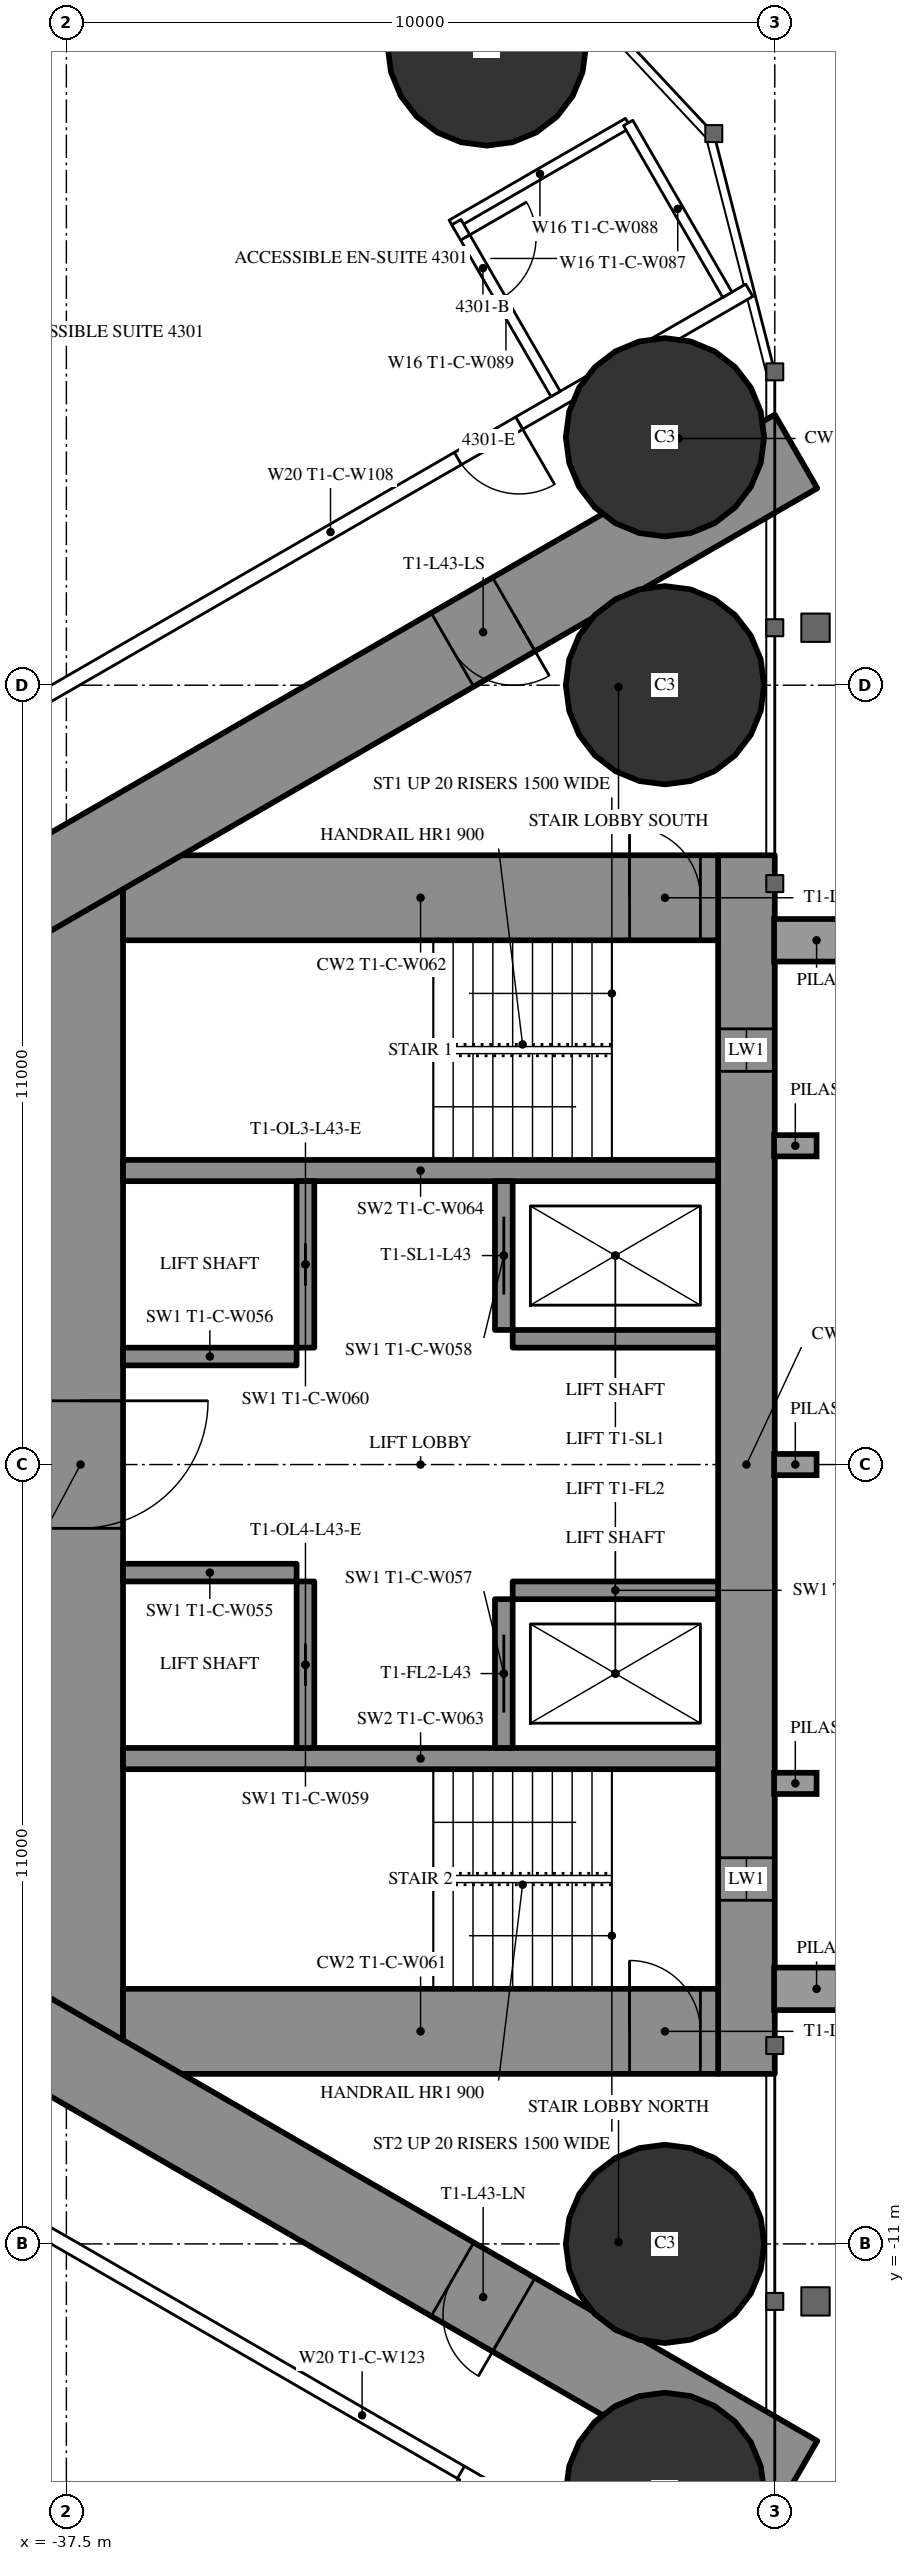
"""IFC4 building model, lengths in metres.
Left out: names, types, materials, properties, quantities, classifications, styles, units other than length and angle.
Written with IfcOpenShell. Run it as: python <this file> out.ifc"""

import sys

from ifc_helpers import new_model, si_unit, direction, frame, frame_2d, origin, origin_2d, place, context, subcontext, project, spatial, rectangle, circle, extrude, element, fill, save


model = new_model("IFC4")
c1 = context("Model", 3, precision=1e-05, world=origin(), true_north=direction((0.0, 1.0)))
c2 = subcontext(c1, "Body", "Model", "MODEL_VIEW")
j1 = project(units=[si_unit("LENGTHUNIT", "METRE"), si_unit("PLANEANGLEUNIT", "RADIAN")], contexts=[c1])
p1 = place(None, origin())
s1 = spatial("IfcSite", under=j1, at=p1, CompositionType="ELEMENT")
p2 = place(p1, origin())
s2 = spatial("IfcBuilding", under=s1, at=p2, CompositionType="ELEMENT")
p3 = place(p2, frame((0.0, 0.0, 163.3)))
s3 = spatial("IfcBuildingStorey", under=s2, at=p3, CompositionType="ELEMENT", Elevation=163.3)
for number, where, z_axis, x_axis in (
    (1, (-31.565, 20.016, 0.0), (0.0, 0.0, 1.0), (1.0, 0.0, 0.0)),
    (2, (-29.05, -11.0, 0.0), (0.0, 0.0, 1.0), (1.0, 0.0, 0.0)),
    (3, (-29.05, 11.0, 0.0), (0.0, 0.0, 1.0), (1.0, 0.0, 0.0)),
    (4, (-29.05, 14.5, 0.0), (0.0, 0.0, 1.0), (1.0, 0.0, 0.0)),
    (5, (-29.05, -14.5, 0.0), (0.0, 0.0, 1.0), (1.0, 0.0, 0.0)),
):
    element("IfcColumn", number, at=place(p3, frame(where, z_axis=z_axis, x_axis=x_axis)), inside=s3, PredefinedType="COLUMN", context=c2, shape_type="SweptSolid", body=[
        extrude(circle(Radius=1.4, at=origin_2d()), origin(), (0.0, 0.0, 1.0), 3.5),
    ])
p4 = place(p3, frame((-27.9, 8.6, 0.0), z_axis=(0.0, 0.0, 1.0), x_axis=(0.0, -1.0, 0.0)))
e6 = element("IfcWall", 6, at=p4, inside=s3, PredefinedType="SHEAR", context=c2, shape_type="SweptSolid", body=[
    extrude(rectangle(XDim=17.2, YDim=0.8, at=frame_2d((8.6, 0.0))), origin(), (0.0, 0.0, 1.0), 3.5),
])
p5 = place(p4, frame((2.45, 0.0, 0.6)))
e7 = element("IfcOpeningElement", 7, at=p5, cuts=e6, PredefinedType="OPENING", context=c2, shape_type="SweptSolid", body=[
    extrude(rectangle(XDim=0.6, YDim=2.1, at=frame_2d((0.3, 1.05))), frame((0.0, 0.41, 0.0), z_axis=(0.0, -1.0, 0.0), x_axis=(1.0, 0.0, 0.0)), (0.0, 0.0, 1.0), 0.82),
])
p6 = place(p4, frame((14.15, 0.0, 0.6)))
e8 = element("IfcOpeningElement", 8, at=p6, cuts=e6, PredefinedType="OPENING", context=c2, shape_type="SweptSolid", body=[
    extrude(rectangle(XDim=0.6, YDim=2.1, at=frame_2d((0.3, 1.05))), frame((0.0, 0.41, 0.0), z_axis=(0.0, -1.0, 0.0), x_axis=(1.0, 0.0, 0.0)), (0.0, 0.0, 1.0), 0.82),
])
p7 = place(p3, frame((-37.3, 8.6, 0.0), z_axis=(0.0, 0.0, 1.0), x_axis=(0.0, -1.0, 0.0)))
e9 = element("IfcWall", 9, at=p7, inside=s3, PredefinedType="SHEAR", context=c2, shape_type="SweptSolid", body=[
    extrude(rectangle(XDim=17.2, YDim=1.2, at=frame_2d((8.6, 0.0))), origin(), (0.0, 0.0, 1.0), 3.5),
])
p8 = place(p7, frame((7.7, 0.0, 0.0)))
e10 = element("IfcOpeningElement", 10, at=p8, cuts=e9, PredefinedType="OPENING", context=c2, shape_type="SweptSolid", body=[
    extrude(rectangle(XDim=1.8, YDim=2.2, at=frame_2d((0.9, 1.1))), frame((0.0, 0.61, 0.0), z_axis=(0.0, -1.0, 0.0), x_axis=(1.0, 0.0, 0.0)), (0.0, 0.0, 1.0), 1.22),
])
p9 = place(p3, frame((-28.3, 8.0, 0.0), z_axis=(0.0, 0.0, 1.0), x_axis=(-1.0, 0.0, 0.0)))
e11 = element("IfcWall", 11, at=p9, inside=s3, PredefinedType="SHEAR", context=c2, shape_type="SweptSolid", body=[
    extrude(rectangle(XDim=8.4, YDim=1.2, at=frame_2d((4.2, 0.0))), origin(), (0.0, 0.0, 1.0), 3.5),
])
p10 = place(p9, frame((0.25, 0.0, 0.0)))
e12 = element("IfcOpeningElement", 12, at=p10, cuts=e11, PredefinedType="OPENING", context=c2, shape_type="SweptSolid", body=[
    extrude(rectangle(XDim=1.0, YDim=2.2, at=frame_2d((0.5, 1.1))), frame((0.0, 0.61, 0.0), z_axis=(0.0, -1.0, 0.0), x_axis=(1.0, 0.0, 0.0)), (0.0, 0.0, 1.0), 1.22),
])
p11 = place(p3, frame((-28.3, -8.0, 0.0), z_axis=(0.0, 0.0, 1.0), x_axis=(-1.0, 0.0, 0.0)))
e13 = element("IfcWall", 13, at=p11, inside=s3, PredefinedType="SHEAR", context=c2, shape_type="SweptSolid", body=[
    extrude(rectangle(XDim=8.4, YDim=1.2, at=frame_2d((4.2, 0.0))), origin(), (0.0, 0.0, 1.0), 3.5),
])
p12 = place(p11, frame((0.25, 0.0, 0.0)))
e14 = element("IfcOpeningElement", 14, at=p12, cuts=e13, PredefinedType="OPENING", context=c2, shape_type="SweptSolid", body=[
    extrude(rectangle(XDim=1.0, YDim=2.2, at=frame_2d((0.5, 1.1))), frame((0.0, 0.61, 0.0), z_axis=(0.0, -1.0, 0.0), x_axis=(1.0, 0.0, 0.0)), (0.0, 0.0, 1.0), 1.22),
])
for number, where, z_axis, x_axis in (
    (15, (-28.3, 4.15, 0.0), (0.0, 0.0, 1.0), (-1.0, 0.0, 0.0)),
    (16, (-28.3, -4.15, 0.0), (0.0, 0.0, 1.0), (-1.0, 0.0, 0.0)),
):
    element("IfcWall", number, at=place(p3, frame(where, z_axis=z_axis, x_axis=x_axis)), inside=s3, PredefinedType="SHEAR", context=c2, shape_type="SweptSolid", body=[
        extrude(rectangle(XDim=8.4, YDim=0.3, at=frame_2d((4.2, 0.0))), origin(), (0.0, 0.0, 1.0), 3.5),
    ])
p13 = place(p3, frame((-31.325, 4.0, 0.0), z_axis=(0.0, 0.0, 1.0), x_axis=(0.0, -1.0, 0.0)))
e17 = element("IfcWall", 17, at=p13, inside=s3, PredefinedType="SHEAR", context=c2, shape_type="SweptSolid", body=[
    extrude(rectangle(XDim=2.1, YDim=0.25, at=frame_2d((1.05, 0.0))), origin(), (0.0, 0.0, 1.0), 3.5),
])
p14 = place(p13, frame((0.5, 0.0, 0.0)))
e18 = element("IfcOpeningElement", 18, at=p14, cuts=e17, PredefinedType="OPENING", context=c2, shape_type="SweptSolid", body=[
    extrude(rectangle(XDim=1.1, YDim=2.2, at=frame_2d((0.55, 1.1))), frame((0.0, 0.135, 0.0), z_axis=(0.0, -1.0, 0.0), x_axis=(1.0, 0.0, 0.0)), (0.0, 0.0, 1.0), 0.27),
])
p15 = place(p3, frame((-34.125, 4.0, 0.0), z_axis=(0.0, 0.0, 1.0), x_axis=(0.0, -1.0, 0.0)))
e19 = element("IfcWall", 19, at=p15, inside=s3, PredefinedType="SHEAR", context=c2, shape_type="SweptSolid", body=[
    extrude(rectangle(XDim=2.35, YDim=0.25, at=frame_2d((1.175, 0.0))), origin(), (0.0, 0.0, 1.0), 3.5),
])
p16 = place(p15, frame((0.875, 0.0, 0.0)))
e20 = element("IfcOpeningElement", 20, at=p16, cuts=e19, PredefinedType="OPENING", context=c2, shape_type="SweptSolid", body=[
    extrude(rectangle(XDim=0.6, YDim=2.0, at=frame_2d((0.3, 1.0))), frame((0.0, 0.135, 0.0), z_axis=(0.0, -1.0, 0.0), x_axis=(1.0, 0.0, 0.0)), (0.0, 0.0, 1.0), 0.27),
])
p17 = place(p3, frame((-28.3, 1.775, 0.0), z_axis=(0.0, 0.0, 1.0), x_axis=(-1.0, 0.0, 0.0)))
e21 = element("IfcWall", 21, at=p17, inside=s3, PredefinedType="SHEAR", context=c2, shape_type="SweptSolid", body=[
    extrude(rectangle(XDim=2.9, YDim=0.25, at=frame_2d((1.45, 0.0))), origin(), (0.0, 0.0, 1.0), 3.5),
])
p18 = place(p3, frame((-34.25, 1.525, 0.0), z_axis=(0.0, 0.0, 1.0), x_axis=(-1.0, 0.0, 0.0)))
e22 = element("IfcWall", 22, at=p18, inside=s3, PredefinedType="SHEAR", context=c2, shape_type="SweptSolid", body=[
    extrude(rectangle(XDim=2.45, YDim=0.25, at=frame_2d((1.225, 0.0))), origin(), (0.0, 0.0, 1.0), 3.5),
])
p19 = place(p3, frame((-31.325, -1.9, 0.0), z_axis=(0.0, 0.0, 1.0), x_axis=(0.0, -1.0, 0.0)))
e23 = element("IfcWall", 23, at=p19, inside=s3, PredefinedType="SHEAR", context=c2, shape_type="SweptSolid", body=[
    extrude(rectangle(XDim=2.1, YDim=0.25, at=frame_2d((1.05, 0.0))), origin(), (0.0, 0.0, 1.0), 3.5),
])
p20 = place(p19, frame((0.5, 0.0, 0.0)))
e24 = element("IfcOpeningElement", 24, at=p20, cuts=e23, PredefinedType="OPENING", context=c2, shape_type="SweptSolid", body=[
    extrude(rectangle(XDim=1.1, YDim=2.2, at=frame_2d((0.55, 1.1))), frame((0.0, 0.135, 0.0), z_axis=(0.0, -1.0, 0.0), x_axis=(1.0, 0.0, 0.0)), (0.0, 0.0, 1.0), 0.27),
])
p21 = place(p3, frame((-34.125, -1.65, 0.0), z_axis=(0.0, 0.0, 1.0), x_axis=(0.0, -1.0, 0.0)))
e25 = element("IfcWall", 25, at=p21, inside=s3, PredefinedType="SHEAR", context=c2, shape_type="SweptSolid", body=[
    extrude(rectangle(XDim=2.35, YDim=0.25, at=frame_2d((1.175, 0.0))), origin(), (0.0, 0.0, 1.0), 3.5),
])
p22 = place(p21, frame((0.875, 0.0, 0.0)))
e26 = element("IfcOpeningElement", 26, at=p22, cuts=e25, PredefinedType="OPENING", context=c2, shape_type="SweptSolid", body=[
    extrude(rectangle(XDim=0.6, YDim=2.0, at=frame_2d((0.3, 1.0))), frame((0.0, 0.135, 0.0), z_axis=(0.0, -1.0, 0.0), x_axis=(1.0, 0.0, 0.0)), (0.0, 0.0, 1.0), 0.27),
])
p23 = place(p3, frame((-28.3, -1.775, 0.0), z_axis=(0.0, 0.0, 1.0), x_axis=(-1.0, 0.0, 0.0)))
e27 = element("IfcWall", 27, at=p23, inside=s3, PredefinedType="SHEAR", context=c2, shape_type="SweptSolid", body=[
    extrude(rectangle(XDim=2.9, YDim=0.25, at=frame_2d((1.45, 0.0))), origin(), (0.0, 0.0, 1.0), 3.5),
])
p24 = place(p3, frame((-34.25, -1.525, 0.0), z_axis=(0.0, 0.0, 1.0), x_axis=(-1.0, 0.0, 0.0)))
e28 = element("IfcWall", 28, at=p24, inside=s3, PredefinedType="SHEAR", context=c2, shape_type="SweptSolid", body=[
    extrude(rectangle(XDim=2.45, YDim=0.25, at=frame_2d((1.225, 0.0))), origin(), (0.0, 0.0, 1.0), 3.5),
])
p25 = place(p3, frame((-27.2, 14.3, 0.0), z_axis=(0.0, 0.0, 1.0), x_axis=(-0.866026593062, -0.499997940104, 0.0)))
e29 = element("IfcWall", 29, at=p25, inside=s3, PredefinedType="SHEAR", context=c2, shape_type="SweptSolid", body=[
    extrude(rectangle(XDim=28.946, YDim=1.2, at=frame_2d((14.473, 0.0))), origin(), (0.0, 0.0, 1.0), 3.5),
])
p26 = place(p25, frame((4.6, 0.0, 0.0)))
e30 = element("IfcOpeningElement", 30, at=p26, cuts=e29, PredefinedType="OPENING", context=c2, shape_type="SweptSolid", body=[
    extrude(rectangle(XDim=1.0, YDim=2.2, at=frame_2d((0.5, 1.1))), frame((0.0, 0.61, 0.0), z_axis=(0.0, -1.0, 0.0), x_axis=(1.0, 0.0, 0.0)), (0.0, 0.0, 1.0), 1.22),
])
p27 = place(p25, frame((13.395, 0.0, 0.0)))
e31 = element("IfcOpeningElement", 31, at=p27, cuts=e29, PredefinedType="OPENING", context=c2, shape_type="SweptSolid", body=[
    extrude(rectangle(XDim=1.8, YDim=2.2, at=frame_2d((0.9, 1.1))), frame((0.0, 0.61, 0.0), z_axis=(0.0, -1.0, 0.0), x_axis=(1.0, 0.0, 0.0)), (0.0, 0.0, 1.0), 1.22),
])
p28 = place(p3, frame((-27.2, -14.3, 0.0), z_axis=(0.0, 0.0, 1.0), x_axis=(-0.866024021859, 0.500002393557, 0.0)))
e32 = element("IfcWall", 32, at=p28, inside=s3, PredefinedType="SHEAR", context=c2, shape_type="SweptSolid", body=[
    extrude(rectangle(XDim=27.907, YDim=1.2, at=frame_2d((13.954, 0.0))), origin(), (0.0, 0.0, 1.0), 3.5),
])
p29 = place(p28, frame((4.6, 0.0, 0.0)))
e33 = element("IfcOpeningElement", 33, at=p29, cuts=e32, PredefinedType="OPENING", context=c2, shape_type="SweptSolid", body=[
    extrude(rectangle(XDim=1.0, YDim=2.2, at=frame_2d((0.5, 1.1))), frame((0.0, 0.61, 0.0), z_axis=(0.0, -1.0, 0.0), x_axis=(1.0, 0.0, 0.0)), (0.0, 0.0, 1.0), 1.22),
])
p30 = place(p28, frame((13.395, 0.0, 0.0)))
e34 = element("IfcOpeningElement", 34, at=p30, cuts=e32, PredefinedType="OPENING", context=c2, shape_type="SweptSolid", body=[
    extrude(rectangle(XDim=1.8, YDim=2.2, at=frame_2d((0.9, 1.1))), frame((0.0, 0.61, 0.0), z_axis=(0.0, -1.0, 0.0), x_axis=(1.0, 0.0, 0.0)), (0.0, 0.0, 1.0), 1.22),
])
p31 = place(p3, frame((-27.86, -16.575, 0.0), z_axis=(0.0, 0.0, 1.0), x_axis=(-0.866027756871, 0.499995924312, 0.0)))
e35 = element("IfcWall", 35, at=p31, inside=s3, PredefinedType="PARTITIONING", context=c2, shape_type="SweptSolid", body=[
    extrude(rectangle(XDim=12.622, YDim=0.2, at=frame_2d((6.311, 0.0))), origin(), (0.0, 0.0, 1.0), 3.25),
])
p32 = place(p31, frame((3.75, 0.0, 0.0)))
e36 = element("IfcOpeningElement", 36, at=p32, cuts=e35, PredefinedType="OPENING", context=c2, shape_type="SweptSolid", body=[
    extrude(rectangle(XDim=0.95, YDim=2.2, at=frame_2d((0.475, 1.1))), frame((0.0, 0.11, 0.0), z_axis=(0.0, -1.0, 0.0), x_axis=(1.0, 0.0, 0.0)), (0.0, 0.0, 1.0), 0.22),
])
p33 = place(p3, frame((-27.86, 16.575, 0.0), z_axis=(0.0, 0.0, 1.0), x_axis=(-0.866026850238, -0.499997494661, 0.0)))
e37 = element("IfcWall", 37, at=p33, inside=s3, PredefinedType="PARTITIONING", context=c2, shape_type="SweptSolid", body=[
    extrude(rectangle(XDim=13.651, YDim=0.2, at=frame_2d((6.826, 0.0))), origin(), (0.0, 0.0, 1.0), 3.25),
])
p34 = place(p33, frame((3.75, 0.0, 0.0)))
e38 = element("IfcOpeningElement", 38, at=p34, cuts=e37, PredefinedType="OPENING", context=c2, shape_type="SweptSolid", body=[
    extrude(rectangle(XDim=1.0, YDim=2.2, at=frame_2d((0.5, 1.1))), frame((0.0, 0.11, 0.0), z_axis=(0.0, -1.0, 0.0), x_axis=(1.0, 0.0, 0.0)), (0.0, 0.0, 1.0), 0.22),
])
p35 = place(p3, frame((-29.57, 18.936, 0.0), z_axis=(0.0, 0.0, 1.0), x_axis=(-0.866018712932, -0.500011588718, 0.0)))
e39 = element("IfcWall", 39, at=p35, inside=s3, PredefinedType="PARTITIONING", context=c2, shape_type="SweptSolid", body=[
    extrude(rectangle(XDim=2.875, YDim=0.15, at=frame_2d((1.438, 0.0))), origin(), (0.0, 0.0, 1.0), 3.25),
])
p36 = place(p3, frame((-30.595, 15.111, 0.0), z_axis=(0.0, 0.0, 1.0), x_axis=(-0.49998411664, 0.866034573852, 0.0)))
e40 = element("IfcWall", 40, at=p36, inside=s3, PredefinedType="PARTITIONING", context=c2, shape_type="SweptSolid", body=[
    extrude(rectangle(XDim=2.8, YDim=0.15, at=frame_2d((1.4, 0.0))), origin(), (0.0, 0.0, 1.0), 3.25),
])
p37 = place(p36, frame((1.55, 0.0, 0.0)))
e41 = element("IfcOpeningElement", 41, at=p37, cuts=e40, PredefinedType="OPENING", context=c2, shape_type="SweptSolid", body=[
    extrude(rectangle(XDim=1.0, YDim=2.2, at=frame_2d((0.5, 1.1))), frame((0.0, 0.085, 0.0), z_axis=(0.0, -1.0, 0.0), x_axis=(1.0, 0.0, 0.0)), (0.0, 0.0, 1.0), 0.17),
])
p38 = place(p3, frame((-28.17, 16.511, 0.0), z_axis=(0.0, 0.0, 1.0), x_axis=(-0.49994636267, 0.866056369097, 0.0)))
e42 = element("IfcWall", 42, at=p38, inside=s3, PredefinedType="PARTITIONING", context=c2, shape_type="SweptSolid", body=[
    extrude(rectangle(XDim=2.8, YDim=0.15, at=frame_2d((1.4, 0.0))), origin(), (0.0, 0.0, 1.0), 3.25),
])
p39 = place(p37, origin())
e43 = element("IfcDoor", 43, at=p39, inside=s3, OperationType="SINGLE_SWING_RIGHT", PredefinedType="DOOR", context=c2, shape_type="SweptSolid", body=[
    extrude(rectangle(XDim=1.0, YDim=2.2, at=frame_2d((0.5, 1.1))), frame((0.0, 0.025, 0.0), z_axis=(0.0, -1.0, 0.0), x_axis=(1.0, 0.0, 0.0)), (0.0, 0.0, 1.0), 0.05),
])
fill(e41, e43)
p40 = place(p34, origin())
e44 = element("IfcDoor", 44, at=p40, inside=s3, OperationType="SINGLE_SWING_LEFT", PredefinedType="DOOR", context=c2, shape_type="SweptSolid", body=[
    extrude(rectangle(XDim=1.0, YDim=2.2, at=frame_2d((0.5, 1.1))), frame((0.0, 0.025, 0.0), z_axis=(0.0, -1.0, 0.0), x_axis=(1.0, 0.0, 0.0)), (0.0, 0.0, 1.0), 0.05),
])
fill(e38, e44)
p41 = place(p32, origin())
e45 = element("IfcDoor", 45, at=p41, inside=s3, OperationType="SINGLE_SWING_LEFT", PredefinedType="DOOR", context=c2, shape_type="SweptSolid", body=[
    extrude(rectangle(XDim=0.95, YDim=2.2, at=frame_2d((0.475, 1.1))), frame((0.0, 0.025, 0.0), z_axis=(0.0, -1.0, 0.0), x_axis=(1.0, 0.0, 0.0)), (0.0, 0.0, 1.0), 0.05),
])
fill(e36, e45)
p42 = place(p26, origin())
e46 = element("IfcDoor", 46, at=p42, inside=s3, OperationType="SINGLE_SWING_LEFT", PredefinedType="DOOR", context=c2, shape_type="SweptSolid", body=[
    extrude(rectangle(XDim=1.0, YDim=2.2, at=frame_2d((0.5, 1.1))), frame((0.0, 0.025, 0.0), z_axis=(0.0, -1.0, 0.0), x_axis=(1.0, 0.0, 0.0)), (0.0, 0.0, 1.0), 0.05),
])
fill(e30, e46)
p43 = place(p29, origin())
e47 = element("IfcDoor", 47, at=p43, inside=s3, OperationType="SINGLE_SWING_LEFT", PredefinedType="DOOR", context=c2, shape_type="SweptSolid", body=[
    extrude(rectangle(XDim=1.0, YDim=2.2, at=frame_2d((0.5, 1.1))), frame((0.0, 0.025, 0.0), z_axis=(0.0, -1.0, 0.0), x_axis=(1.0, 0.0, 0.0)), (0.0, 0.0, 1.0), 0.05),
])
fill(e33, e47)
p44 = place(p8, origin())
e48 = element("IfcDoor", 48, at=p44, inside=s3, OperationType="DOUBLE_DOOR_SINGLE_SWING", PredefinedType="DOOR", context=c2, shape_type="SweptSolid", body=[
    extrude(rectangle(XDim=1.8, YDim=2.2, at=frame_2d((0.9, 1.1))), frame((0.0, 0.025, 0.0), z_axis=(0.0, -1.0, 0.0), x_axis=(1.0, 0.0, 0.0)), (0.0, 0.0, 1.0), 0.05),
])
fill(e10, e48)
p45 = place(p10, origin())
e49 = element("IfcDoor", 49, at=p45, inside=s3, OperationType="SINGLE_SWING_RIGHT", PredefinedType="DOOR", context=c2, shape_type="SweptSolid", body=[
    extrude(rectangle(XDim=1.0, YDim=2.2, at=frame_2d((0.5, 1.1))), frame((0.0, 0.025, 0.0), z_axis=(0.0, -1.0, 0.0), x_axis=(1.0, 0.0, 0.0)), (0.0, 0.0, 1.0), 0.05),
])
fill(e12, e49)
p46 = place(p12, origin())
e50 = element("IfcDoor", 50, at=p46, inside=s3, OperationType="SINGLE_SWING_RIGHT", PredefinedType="DOOR", context=c2, shape_type="SweptSolid", body=[
    extrude(rectangle(XDim=1.0, YDim=2.2, at=frame_2d((0.5, 1.1))), frame((0.0, 0.025, 0.0), z_axis=(0.0, -1.0, 0.0), x_axis=(1.0, 0.0, 0.0)), (0.0, 0.0, 1.0), 0.05),
])
fill(e14, e50)
p47 = place(p14, origin())
e51 = element("IfcDoor", 51, at=p47, inside=s3, OperationType="SLIDING_TO_LEFT", PredefinedType="USERDEFINED", context=c2, shape_type="SweptSolid", body=[
    extrude(rectangle(XDim=1.1, YDim=2.2, at=frame_2d((0.55, 1.1))), frame((0.0, 0.025, 0.0), z_axis=(0.0, -1.0, 0.0), x_axis=(1.0, 0.0, 0.0)), (0.0, 0.0, 1.0), 0.05),
])
fill(e18, e51)
p48 = place(p20, origin())
e52 = element("IfcDoor", 52, at=p48, inside=s3, OperationType="SLIDING_TO_LEFT", PredefinedType="USERDEFINED", context=c2, shape_type="SweptSolid", body=[
    extrude(rectangle(XDim=1.1, YDim=2.2, at=frame_2d((0.55, 1.1))), frame((0.0, 0.025, 0.0), z_axis=(0.0, -1.0, 0.0), x_axis=(1.0, 0.0, 0.0)), (0.0, 0.0, 1.0), 0.05),
])
fill(e24, e52)
p49 = place(p16, origin())
e53 = element("IfcDoor", 53, at=p49, inside=s3, OperationType="SLIDING_TO_LEFT", PredefinedType="DOOR", context=c2, shape_type="SweptSolid", body=[
    extrude(rectangle(XDim=0.6, YDim=2.0, at=frame_2d((0.3, 1.0))), frame((0.0, 0.025, 0.0), z_axis=(0.0, -1.0, 0.0), x_axis=(1.0, 0.0, 0.0)), (0.0, 0.0, 1.0), 0.05),
])
fill(e20, e53)
p50 = place(p22, origin())
e54 = element("IfcDoor", 54, at=p50, inside=s3, OperationType="SLIDING_TO_LEFT", PredefinedType="DOOR", context=c2, shape_type="SweptSolid", body=[
    extrude(rectangle(XDim=0.6, YDim=2.0, at=frame_2d((0.3, 1.0))), frame((0.0, 0.025, 0.0), z_axis=(0.0, -1.0, 0.0), x_axis=(1.0, 0.0, 0.0)), (0.0, 0.0, 1.0), 0.05),
])
fill(e26, e54)
p51 = place(p5, origin())
e55 = element("IfcWindow", 55, at=p51, inside=s3, PartitioningType="SINGLE_PANEL", PredefinedType="WINDOW", context=c2, shape_type="SweptSolid", body=[
    extrude(rectangle(XDim=0.6, YDim=2.1, at=frame_2d((0.3, 1.05))), frame((0.0, 0.03, 0.0), z_axis=(0.0, -1.0, 0.0), x_axis=(1.0, 0.0, 0.0)), (0.0, 0.0, 1.0), 0.06),
])
fill(e7, e55)
p52 = place(p6, origin())
e56 = element("IfcWindow", 56, at=p52, inside=s3, PartitioningType="SINGLE_PANEL", PredefinedType="WINDOW", context=c2, shape_type="SweptSolid", body=[
    extrude(rectangle(XDim=0.6, YDim=2.1, at=frame_2d((0.3, 1.05))), frame((0.0, 0.03, 0.0), z_axis=(0.0, -1.0, 0.0), x_axis=(1.0, 0.0, 0.0)), (0.0, 0.0, 1.0), 0.06),
])
fill(e8, e56)
save(model, sys.argv[1])
